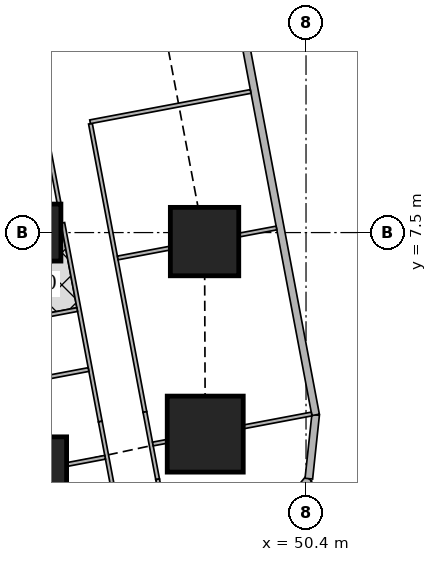
"""IFC4 building model, lengths in metres.
Left out: names, types, materials, properties, quantities, classifications, styles, units other than length and angle.
Written with IfcOpenShell. Run it as: python <this file> out.ifc"""

import sys

from ifc_helpers import new_model, si_unit, direction, frame, frame_2d, origin, origin_2d, place, context, subcontext, project, spatial, rectangle, extrude, element, fill, save


model = new_model("IFC4")
c1 = context("Model", 3, precision=1e-05, world=origin(), true_north=direction((0.0, 1.0)))
c2 = subcontext(c1, "Body", "Model", "MODEL_VIEW")
j1 = project(units=[si_unit("LENGTHUNIT", "METRE"), si_unit("PLANEANGLEUNIT", "RADIAN")], contexts=[c1])
p1 = place(None, origin())
s1 = spatial("IfcSite", under=j1, at=p1, CompositionType="ELEMENT")
p2 = place(p1, origin())
s2 = spatial("IfcBuilding", under=s1, at=p2, CompositionType="ELEMENT")
p3 = place(p2, frame((0.0, 0.0, 147.05)))
s3 = spatial("IfcBuildingStorey", under=s2, at=p3, CompositionType="ELEMENT", Elevation=147.05)
p4 = place(p3, frame((43.2, 1.225, 0.0), z_axis=(0.0, 0.0, 1.0), x_axis=(1.0, 0.0, 0.0)))
e1 = element("IfcColumn", 1, at=p4, inside=s3, PredefinedType="COLUMN", context=c2, shape_type="SweptSolid", body=[
    extrude(rectangle(XDim=1.8, YDim=1.8, at=origin_2d()), origin(), (0.0, 0.0, 1.0), 3.75),
])
p5 = place(p3, frame((47.748, 2.197, 0.0), z_axis=(0.0, 0.0, 1.0), x_axis=(1.0, 0.0, 0.0)))
e2 = element("IfcColumn", 2, at=p5, inside=s3, PredefinedType="COLUMN", context=c2, shape_type="SweptSolid", body=[
    extrude(rectangle(XDim=2.0, YDim=2.0, at=origin_2d()), origin(), (0.0, 0.0, 1.0), 3.75),
])
p6 = place(p3, frame((43.2, 7.5, 0.0), z_axis=(0.0, 0.0, 1.0), x_axis=(1.0, 0.0, 0.0)))
e3 = element("IfcColumn", 3, at=p6, inside=s3, PredefinedType="COLUMN", context=c2, shape_type="SweptSolid", body=[
    extrude(rectangle(XDim=1.5, YDim=1.5, at=origin_2d()), origin(), (0.0, 0.0, 1.0), 3.75),
])
p7 = place(p3, frame((47.73, 7.263, 0.0), z_axis=(0.0, 0.0, 1.0), x_axis=(1.0, 0.0, 0.0)))
e4 = element("IfcColumn", 4, at=p7, inside=s3, PredefinedType="COLUMN", context=c2, shape_type="SweptSolid", body=[
    extrude(rectangle(XDim=1.8, YDim=1.8, at=origin_2d()), origin(), (0.0, 0.0, 1.0), 3.75),
])
p8 = place(p3, frame((49.407, -0.263, 0.0), z_axis=(0.0, 0.0, 1.0), x_axis=(0.638042593423, 0.770001070764, 0.0)))
e5 = element("IfcWall", 5, at=p8, inside=s3, PredefinedType="SOLIDWALL", context=c2, shape_type="SweptSolid", body=[
    extrude(rectangle(XDim=1.673, YDim=0.2, at=frame_2d((0.836, 0.0))), origin(), (0.0, 0.0, 1.0), 3.5),
])
p9 = place(p3, frame((50.474, 1.025, 0.0), z_axis=(0.0, 0.0, 1.0), x_axis=(0.106047815515, 0.994361031429, 0.0)))
e6 = element("IfcWall", 6, at=p9, inside=s3, PredefinedType="SOLIDWALL", context=c2, shape_type="SweptSolid", body=[
    extrude(rectangle(XDim=1.688, YDim=0.2, at=frame_2d((0.844, 0.0))), origin(), (0.0, 0.0, 1.0), 3.5),
])
p10 = place(p3, frame((50.653, 2.703, 0.0), z_axis=(0.0, 0.0, 1.0), x_axis=(-0.185612026696, 0.982623109613, 0.0)))
e7 = element("IfcWall", 7, at=p10, inside=s3, PredefinedType="SOLIDWALL", context=c2, shape_type="SweptSolid", body=[
    extrude(rectangle(XDim=41.393, YDim=0.2, at=frame_2d((20.697, 0.0))), origin(), (0.0, 0.0, 1.0), 3.5),
])
p11 = place(p10, frame((1.633, 0.0, 0.9)))
e8 = element("IfcOpeningElement", 8, at=p11, cuts=e7, PredefinedType="OPENING", context=c2, shape_type="SweptSolid", body=[
    extrude(rectangle(XDim=1.8, YDim=1.5, at=frame_2d((0.9, 0.75))), frame((0.0, 0.11, 0.0), z_axis=(0.0, -1.0, 0.0), x_axis=(1.0, 0.0, 0.0)), (0.0, 0.0, 1.0), 0.22),
])
p12 = place(p10, frame((6.032, 0.0, 0.9)))
e9 = element("IfcOpeningElement", 9, at=p12, cuts=e7, PredefinedType="OPENING", context=c2, shape_type="SweptSolid", body=[
    extrude(rectangle(XDim=1.8, YDim=1.5, at=frame_2d((0.9, 0.75))), frame((0.0, 0.11, 0.0), z_axis=(0.0, -1.0, 0.0), x_axis=(1.0, 0.0, 0.0)), (0.0, 0.0, 1.0), 0.22),
])
p13 = place(p10, frame((9.848, 0.0, 0.9)))
e10 = element("IfcOpeningElement", 10, at=p13, cuts=e7, PredefinedType="OPENING", context=c2, shape_type="SweptSolid", body=[
    extrude(rectangle(XDim=1.8, YDim=1.5, at=frame_2d((0.9, 0.75))), frame((0.0, 0.11, 0.0), z_axis=(0.0, -1.0, 0.0), x_axis=(1.0, 0.0, 0.0)), (0.0, 0.0, 1.0), 0.22),
])
p14 = place(p10, frame((13.664, 0.0, 0.9)))
e11 = element("IfcOpeningElement", 11, at=p14, cuts=e7, PredefinedType="OPENING", context=c2, shape_type="SweptSolid", body=[
    extrude(rectangle(XDim=1.8, YDim=1.5, at=frame_2d((0.9, 0.75))), frame((0.0, 0.11, 0.0), z_axis=(0.0, -1.0, 0.0), x_axis=(1.0, 0.0, 0.0)), (0.0, 0.0, 1.0), 0.22),
])
p15 = place(p10, frame((17.481, 0.0, 0.9)))
e12 = element("IfcOpeningElement", 12, at=p15, cuts=e7, PredefinedType="OPENING", context=c2, shape_type="SweptSolid", body=[
    extrude(rectangle(XDim=1.8, YDim=1.5, at=frame_2d((0.9, 0.75))), frame((0.0, 0.11, 0.0), z_axis=(0.0, -1.0, 0.0), x_axis=(1.0, 0.0, 0.0)), (0.0, 0.0, 1.0), 0.22),
])
p16 = place(p10, frame((21.297, 0.0, 0.9)))
e13 = element("IfcOpeningElement", 13, at=p16, cuts=e7, PredefinedType="OPENING", context=c2, shape_type="SweptSolid", body=[
    extrude(rectangle(XDim=1.8, YDim=1.5, at=frame_2d((0.9, 0.75))), frame((0.0, 0.11, 0.0), z_axis=(0.0, -1.0, 0.0), x_axis=(1.0, 0.0, 0.0)), (0.0, 0.0, 1.0), 0.22),
])
p17 = place(p10, frame((25.113, 0.0, 0.9)))
e14 = element("IfcOpeningElement", 14, at=p17, cuts=e7, PredefinedType="OPENING", context=c2, shape_type="SweptSolid", body=[
    extrude(rectangle(XDim=1.8, YDim=1.5, at=frame_2d((0.9, 0.75))), frame((0.0, 0.11, 0.0), z_axis=(0.0, -1.0, 0.0), x_axis=(1.0, 0.0, 0.0)), (0.0, 0.0, 1.0), 0.22),
])
p18 = place(p10, frame((28.93, 0.0, 0.9)))
e15 = element("IfcOpeningElement", 15, at=p18, cuts=e7, PredefinedType="OPENING", context=c2, shape_type="SweptSolid", body=[
    extrude(rectangle(XDim=1.8, YDim=1.5, at=frame_2d((0.9, 0.75))), frame((0.0, 0.11, 0.0), z_axis=(0.0, -1.0, 0.0), x_axis=(1.0, 0.0, 0.0)), (0.0, 0.0, 1.0), 0.22),
])
p19 = place(p10, frame((32.746, 0.0, 0.9)))
e16 = element("IfcOpeningElement", 16, at=p19, cuts=e7, PredefinedType="OPENING", context=c2, shape_type="SweptSolid", body=[
    extrude(rectangle(XDim=1.8, YDim=1.5, at=frame_2d((0.9, 0.75))), frame((0.0, 0.11, 0.0), z_axis=(0.0, -1.0, 0.0), x_axis=(1.0, 0.0, 0.0)), (0.0, 0.0, 1.0), 0.22),
])
p20 = place(p10, frame((36.481, 0.0, 0.9)))
e17 = element("IfcOpeningElement", 17, at=p20, cuts=e7, PredefinedType="OPENING", context=c2, shape_type="SweptSolid", body=[
    extrude(rectangle(XDim=1.8, YDim=1.5, at=frame_2d((0.9, 0.75))), frame((0.0, 0.11, 0.0), z_axis=(0.0, -1.0, 0.0), x_axis=(1.0, 0.0, 0.0)), (0.0, 0.0, 1.0), 0.22),
])
p21 = place(p3, frame((44.727, 10.366, 0.0), z_axis=(0.0, 0.0, 1.0), x_axis=(0.185578957652, -0.982629355595, 0.0)))
e18 = element("IfcWall", 18, at=p21, inside=s3, PredefinedType="PARTITIONING", context=c2, shape_type="SweptSolid", body=[
    extrude(rectangle(XDim=7.721, YDim=0.1, at=frame_2d((3.86, 0.0))), origin(), (0.0, 0.0, 1.0), 3.5),
])
p22 = place(p21, frame((0.151, 0.0, 0.0)))
e19 = element("IfcOpeningElement", 19, at=p22, cuts=e18, PredefinedType="OPENING", context=c2, shape_type="SweptSolid", body=[
    extrude(rectangle(XDim=0.9, YDim=2.1, at=frame_2d((0.45, 1.05))), frame((0.0, 0.06, 0.0), z_axis=(0.0, -1.0, 0.0), x_axis=(1.0, 0.0, 0.0)), (0.0, 0.0, 1.0), 0.12),
])
p23 = place(p21, frame((3.806, 0.0, 0.0)))
e20 = element("IfcOpeningElement", 20, at=p23, cuts=e18, PredefinedType="OPENING", context=c2, shape_type="SweptSolid", body=[
    extrude(rectangle(XDim=0.9, YDim=2.1, at=frame_2d((0.45, 1.05))), frame((0.0, 0.06, 0.0), z_axis=(0.0, -1.0, 0.0), x_axis=(1.0, 0.0, 0.0)), (0.0, 0.0, 1.0), 0.12),
])
p24 = place(p3, frame((46.16, 2.779, 0.0), z_axis=(0.0, 0.0, 1.0), x_axis=(0.18597295662, -0.982554863306, 0.0)))
e21 = element("IfcWall", 21, at=p24, inside=s3, PredefinedType="PARTITIONING", context=c2, shape_type="SweptSolid", body=[
    extrude(rectangle(XDim=1.802, YDim=0.1, at=frame_2d((0.901, 0.0))), origin(), (0.0, 0.0, 1.0), 2.1),
])
p25 = place(p3, frame((46.495, 1.008, 0.0), z_axis=(0.0, 0.0, 1.0), x_axis=(0.185535059532, -0.982637645159, 0.0)))
e22 = element("IfcWall", 22, at=p25, inside=s3, PredefinedType="PARTITIONING", context=c2, shape_type="SweptSolid", body=[
    extrude(rectangle(XDim=1.644, YDim=0.1, at=frame_2d((0.822, 0.0))), origin(), (0.0, 0.0, 1.0), 3.5),
])
p26 = place(p3, frame((43.539, 10.192, 0.0), z_axis=(0.0, 0.0, 1.0), x_axis=(0.18564540894, -0.982616803306, 0.0)))
e23 = element("IfcWall", 23, at=p26, inside=s3, PredefinedType="PARTITIONING", context=c2, shape_type="SweptSolid", body=[
    extrude(rectangle(XDim=1.966, YDim=0.1, at=frame_2d((0.983, 0.0))), origin(), (0.0, 0.0, 1.0), 3.5),
])
p27 = place(p3, frame((43.999, 7.755, 0.0), z_axis=(0.0, 0.0, 1.0), x_axis=(0.185565904578, -0.982631820703, 0.0)))
e24 = element("IfcWall", 24, at=p27, inside=s3, PredefinedType="PARTITIONING", context=c2, shape_type="SweptSolid", body=[
    extrude(rectangle(XDim=5.319, YDim=0.1, at=frame_2d((2.66, 0.0))), origin(), (0.0, 0.0, 1.0), 3.5),
])
p28 = place(p27, frame((1.0, 0.0, 0.0)))
e25 = element("IfcOpeningElement", 25, at=p28, cuts=e24, PredefinedType="OPENING", context=c2, shape_type="SweptSolid", body=[
    extrude(rectangle(XDim=0.9, YDim=2.1, at=frame_2d((0.45, 1.05))), frame((0.0, 0.06, 0.0), z_axis=(0.0, -1.0, 0.0), x_axis=(1.0, 0.0, 0.0)), (0.0, 0.0, 1.0), 0.12),
])
p29 = place(p27, frame((4.269, 0.0, 0.0)))
e26 = element("IfcOpeningElement", 26, at=p29, cuts=e24, PredefinedType="OPENING", context=c2, shape_type="SweptSolid", body=[
    extrude(rectangle(XDim=0.9, YDim=2.1, at=frame_2d((0.45, 1.05))), frame((0.0, 0.06, 0.0), z_axis=(0.0, -1.0, 0.0), x_axis=(1.0, 0.0, 0.0)), (0.0, 0.0, 1.0), 0.12),
])
p30 = place(p27, frame((2.665, 0.0, 0.0)))
e27 = element("IfcOpeningElement", 27, at=p30, cuts=e24, PredefinedType="OPENING", context=c2, shape_type="SweptSolid", body=[
    extrude(rectangle(XDim=0.9, YDim=2.1, at=frame_2d((0.45, 1.05))), frame((0.0, 0.06, 0.0), z_axis=(0.0, -1.0, 0.0), x_axis=(1.0, 0.0, 0.0)), (0.0, 0.0, 1.0), 0.12),
])
p31 = place(p3, frame((44.986, 2.528, 0.0), z_axis=(0.0, 0.0, 1.0), x_axis=(0.18584218627, -0.982579605835, 0.0)))
e28 = element("IfcWall", 28, at=p31, inside=s3, PredefinedType="PARTITIONING", context=c2, shape_type="SweptSolid", body=[
    extrude(rectangle(XDim=1.802, YDim=0.1, at=frame_2d((0.901, 0.0))), origin(), (0.0, 0.0, 1.0), 2.1),
])
p32 = place(p3, frame((48.943, 11.213, 0.0), z_axis=(0.0, 0.0, 1.0), x_axis=(-0.982633535512, -0.185556823879, 0.0)))
e29 = element("IfcWall", 29, at=p32, inside=s3, PredefinedType="PARTITIONING", context=c2, shape_type="SweptSolid", body=[
    extrude(rectangle(XDim=4.3, YDim=0.1, at=frame_2d((2.15, 0.0))), origin(), (0.0, 0.0, 1.0), 2.1),
])
p33 = place(p3, frame((49.622, 7.62, 0.0), z_axis=(0.0, 0.0, 1.0), x_axis=(-0.982708646087, -0.185158626332, 0.0)))
e30 = element("IfcWall", 30, at=p33, inside=s3, PredefinedType="PARTITIONING", context=c2, shape_type="SweptSolid", body=[
    extrude(rectangle(XDim=1.0, YDim=0.1, at=frame_2d((0.5, 0.0))), origin(), (0.0, 0.0, 1.0), 3.5),
])
p34 = place(p3, frame((46.82, 7.091, 0.0), z_axis=(0.0, 0.0, 1.0), x_axis=(-0.982689853246, -0.185258339427, 0.0)))
e31 = element("IfcWall", 31, at=p34, inside=s3, PredefinedType="PARTITIONING", context=c2, shape_type="SweptSolid", body=[
    extrude(rectangle(XDim=1.398, YDim=0.1, at=frame_2d((0.699, 0.0))), origin(), (0.0, 0.0, 1.0), 3.5),
])
p35 = place(p3, frame((50.547, 2.726, 0.0), z_axis=(0.0, 0.0, 1.0), x_axis=(-0.982603988143, -0.185713226471, 0.0)))
e32 = element("IfcWall", 32, at=p35, inside=s3, PredefinedType="PARTITIONING", context=c2, shape_type="SweptSolid", body=[
    extrude(rectangle(XDim=1.821, YDim=0.1, at=frame_2d((0.91, 0.0))), origin(), (0.0, 0.0, 1.0), 3.5),
])
p36 = place(p3, frame((46.738, 2.006, 0.0), z_axis=(0.0, 0.0, 1.0), x_axis=(-0.982820466874, -0.184564161994, 0.0)))
e33 = element("IfcWall", 33, at=p36, inside=s3, PredefinedType="PARTITIONING", context=c2, shape_type="SweptSolid", body=[
    extrude(rectangle(XDim=0.374, YDim=0.1, at=frame_2d((0.187, 0.0))), origin(), (0.0, 0.0, 1.0), 2.1),
])
p37 = place(p3, frame((45.114, 1.587, 0.0), z_axis=(0.0, 0.0, 1.0), x_axis=(-0.982567886437, -0.185904138047, 0.0)))
e34 = element("IfcWall", 34, at=p37, inside=s3, PredefinedType="PARTITIONING", context=c2, shape_type="SweptSolid", body=[
    extrude(rectangle(XDim=1.022, YDim=0.1, at=frame_2d((0.511, 0.0))), origin(), (0.0, 0.0, 1.0), 2.1),
])
p38 = place(p3, frame((44.677, 3.896, 0.0), z_axis=(0.0, 0.0, 1.0), x_axis=(-0.982610347627, -0.185679575441, 0.0)))
e35 = element("IfcWall", 35, at=p38, inside=s3, PredefinedType="PARTITIONING", context=c2, shape_type="SweptSolid", body=[
    extrude(rectangle(XDim=3.274, YDim=0.1, at=frame_2d((1.637, 0.0))), origin(), (0.0, 0.0, 1.0), 3.5),
])
p39 = place(p3, frame((44.379, 5.474, 0.0), z_axis=(0.0, 0.0, 1.0), x_axis=(-0.982607026909, -0.185697147715, 0.0)))
e36 = element("IfcWall", 36, at=p39, inside=s3, PredefinedType="PARTITIONING", context=c2, shape_type="SweptSolid", body=[
    extrude(rectangle(XDim=3.275, YDim=0.1, at=frame_2d((1.637, 0.0))), origin(), (0.0, 0.0, 1.0), 3.5),
])
p40 = place(p11, origin())
e37 = element("IfcWindow", 37, at=p40, inside=s3, PartitioningType="SINGLE_PANEL", PredefinedType="WINDOW", context=c2, shape_type="SweptSolid", body=[
    extrude(rectangle(XDim=1.8, YDim=1.5, at=frame_2d((0.9, 0.75))), frame((0.0, 0.03, 0.0), z_axis=(0.0, -1.0, 0.0), x_axis=(1.0, 0.0, 0.0)), (0.0, 0.0, 1.0), 0.06),
])
fill(e8, e37)
p41 = place(p12, origin())
e38 = element("IfcWindow", 38, at=p41, inside=s3, PartitioningType="SINGLE_PANEL", PredefinedType="WINDOW", context=c2, shape_type="SweptSolid", body=[
    extrude(rectangle(XDim=1.8, YDim=1.5, at=frame_2d((0.9, 0.75))), frame((0.0, 0.03, 0.0), z_axis=(0.0, -1.0, 0.0), x_axis=(1.0, 0.0, 0.0)), (0.0, 0.0, 1.0), 0.06),
])
fill(e9, e38)
p42 = place(p22, origin())
e39 = element("IfcDoor", 39, at=p42, inside=s3, OperationType="SINGLE_SWING_LEFT", PredefinedType="DOOR", context=c2, shape_type="SweptSolid", body=[
    extrude(rectangle(XDim=0.9, YDim=2.1, at=frame_2d((0.45, 1.05))), frame((0.0, 0.025, 0.0), z_axis=(0.0, -1.0, 0.0), x_axis=(1.0, 0.0, 0.0)), (0.0, 0.0, 1.0), 0.05),
])
fill(e19, e39)
p43 = place(p23, origin())
e40 = element("IfcDoor", 40, at=p43, inside=s3, OperationType="SINGLE_SWING_LEFT", PredefinedType="DOOR", context=c2, shape_type="SweptSolid", body=[
    extrude(rectangle(XDim=0.9, YDim=2.1, at=frame_2d((0.45, 1.05))), frame((0.0, 0.025, 0.0), z_axis=(0.0, -1.0, 0.0), x_axis=(1.0, 0.0, 0.0)), (0.0, 0.0, 1.0), 0.05),
])
fill(e20, e40)
p44 = place(p28, origin())
e41 = element("IfcDoor", 41, at=p44, inside=s3, OperationType="SINGLE_SWING_LEFT", PredefinedType="DOOR", context=c2, shape_type="SweptSolid", body=[
    extrude(rectangle(XDim=0.9, YDim=2.1, at=frame_2d((0.45, 1.05))), frame((0.0, 0.025, 0.0), z_axis=(0.0, -1.0, 0.0), x_axis=(1.0, 0.0, 0.0)), (0.0, 0.0, 1.0), 0.05),
])
fill(e25, e41)
p45 = place(p29, origin())
e42 = element("IfcDoor", 42, at=p45, inside=s3, OperationType="SINGLE_SWING_LEFT", PredefinedType="DOOR", context=c2, shape_type="SweptSolid", body=[
    extrude(rectangle(XDim=0.9, YDim=2.1, at=frame_2d((0.45, 1.05))), frame((0.0, 0.025, 0.0), z_axis=(0.0, -1.0, 0.0), x_axis=(1.0, 0.0, 0.0)), (0.0, 0.0, 1.0), 0.05),
])
fill(e26, e42)
p46 = place(p30, origin())
e43 = element("IfcDoor", 43, at=p46, inside=s3, OperationType="SINGLE_SWING_RIGHT", PredefinedType="DOOR", context=c2, shape_type="SweptSolid", body=[
    extrude(rectangle(XDim=0.9, YDim=2.1, at=frame_2d((0.45, 1.05))), frame((0.0, 0.025, 0.0), z_axis=(0.0, -1.0, 0.0), x_axis=(1.0, 0.0, 0.0)), (0.0, 0.0, 1.0), 0.05),
])
fill(e27, e43)
save(model, sys.argv[1])
